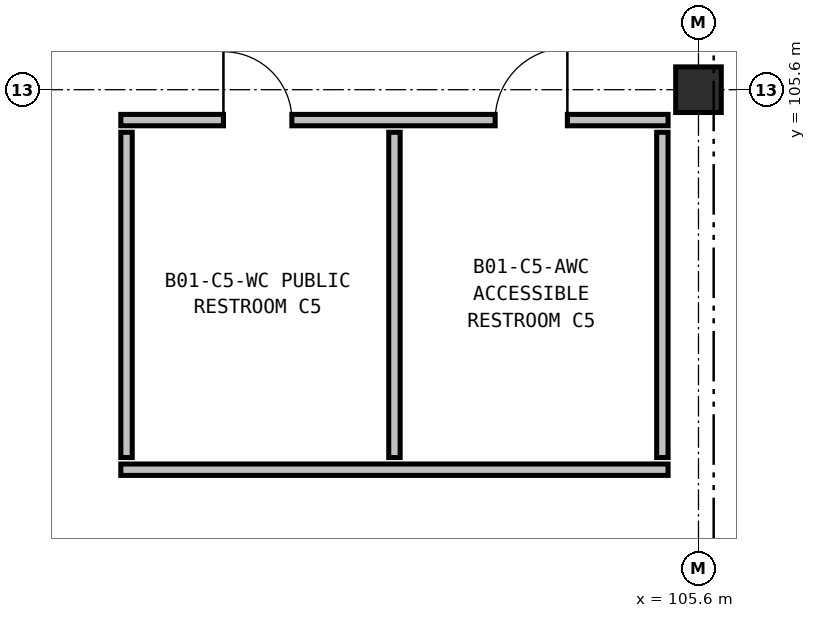
"""IFC4 building model, lengths in metres.
Left out: names, types, materials, properties, quantities, classifications, styles, units other than length and angle.
Written with IfcOpenShell. Run it as: python <this file> out.ifc"""

import sys

from ifc_helpers import new_model, si_unit, direction, frame, frame_2d, origin, origin_2d, place, context, subcontext, project, spatial, rectangle, extrude, element, fill, save


model = new_model("IFC4")
c1 = context("Model", 3, precision=1e-05, world=origin(), true_north=direction((0.0, 1.0)))
c2 = subcontext(c1, "Body", "Model", "MODEL_VIEW")
j1 = project(units=[si_unit("LENGTHUNIT", "METRE"), si_unit("PLANEANGLEUNIT", "RADIAN")], contexts=[c1])
p1 = place(None, origin())
s1 = spatial("IfcSite", under=j1, at=p1, CompositionType="ELEMENT")
p2 = place(p1, origin())
s2 = spatial("IfcBuilding", under=s1, at=p2, CompositionType="ELEMENT")
p3 = place(p2, frame((0.0, 0.0, -5.4)))
s3 = spatial("IfcBuildingStorey", under=s2, at=p3, CompositionType="ELEMENT", Elevation=-5.4)
p4 = place(p3, frame((105.6, 105.6, 0.0), z_axis=(0.0, 0.0, 1.0), x_axis=(1.0, 0.0, 0.0)))
e1 = element("IfcColumn", 1, at=p4, inside=s3, PredefinedType="COLUMN", context=c2, shape_type="SweptSolid", body=[
    extrude(rectangle(XDim=0.6, YDim=0.6, at=origin_2d()), origin(), (0.0, 0.0, 1.0), 5.4),
])
p5 = place(p3, frame((98.0, 105.2, 0.0), z_axis=(0.0, 0.0, 1.0), x_axis=(1.0, 0.0, 0.0)))
e2 = element("IfcWall", 2, at=p5, inside=s3, PredefinedType="PARTITIONING", context=c2, shape_type="SweptSolid", body=[
    extrude(rectangle(XDim=7.2, YDim=0.15, at=frame_2d((3.6, 0.0))), origin(), (0.0, 0.0, 1.0), 5.06),
])
p6 = place(p5, frame((1.35, 0.0, 0.0)))
e3 = element("IfcOpeningElement", 3, at=p6, cuts=e2, PredefinedType="OPENING", context=c2, shape_type="SweptSolid", body=[
    extrude(rectangle(XDim=0.9, YDim=2.1, at=frame_2d((0.45, 1.05))), frame((0.0, 0.085, 0.0), z_axis=(0.0, -1.0, 0.0), x_axis=(1.0, 0.0, 0.0)), (0.0, 0.0, 1.0), 0.17),
])
p7 = place(p5, frame((4.925, 0.0, 0.0)))
e4 = element("IfcOpeningElement", 4, at=p7, cuts=e2, PredefinedType="OPENING", context=c2, shape_type="SweptSolid", body=[
    extrude(rectangle(XDim=0.95, YDim=2.15, at=frame_2d((0.475, 1.075))), frame((0.0, 0.085, 0.0), z_axis=(0.0, -1.0, 0.0), x_axis=(1.0, 0.0, 0.0)), (0.0, 0.0, 1.0), 0.17),
])
p8 = place(p3, frame((98.0, 100.6, 0.0), z_axis=(0.0, 0.0, 1.0), x_axis=(1.0, 0.0, 0.0)))
e5 = element("IfcWall", 5, at=p8, inside=s3, PredefinedType="PARTITIONING", context=c2, shape_type="SweptSolid", body=[
    extrude(rectangle(XDim=7.2, YDim=0.15, at=frame_2d((3.6, 0.0))), origin(), (0.0, 0.0, 1.0), 5.06),
])
for number, where, z_axis, x_axis in (
    (6, (98.075, 100.76, 0.0), (0.0, 0.0, 1.0), (0.0, 1.0, 0.0)),
    (7, (101.6, 100.76, 0.0), (0.0, 0.0, 1.0), (0.0, 1.0, 0.0)),
    (8, (105.125, 100.76, 0.0), (0.0, 0.0, 1.0), (0.0, 1.0, 0.0)),
):
    element("IfcWall", number, at=place(p3, frame(where, z_axis=z_axis, x_axis=x_axis)), inside=s3, PredefinedType="PARTITIONING", context=c2, shape_type="SweptSolid", body=[
        extrude(rectangle(XDim=4.28, YDim=0.15, at=frame_2d((2.14, 0.0))), origin(), (0.0, 0.0, 1.0), 4.435),
    ])
p9 = place(p6, origin())
e9 = element("IfcDoor", 9, at=p9, inside=s3, OperationType="SINGLE_SWING_LEFT", PredefinedType="DOOR", context=c2, shape_type="SweptSolid", body=[
    extrude(rectangle(XDim=0.9, YDim=2.1, at=frame_2d((0.45, 1.05))), frame((0.0, 0.025, 0.0), z_axis=(0.0, -1.0, 0.0), x_axis=(1.0, 0.0, 0.0)), (0.0, 0.0, 1.0), 0.05),
])
fill(e3, e9)
p10 = place(p7, origin())
e10 = element("IfcDoor", 10, at=p10, inside=s3, OperationType="SINGLE_SWING_RIGHT", PredefinedType="DOOR", context=c2, shape_type="SweptSolid", body=[
    extrude(rectangle(XDim=0.95, YDim=2.15, at=frame_2d((0.475, 1.075))), frame((0.0, 0.025, 0.0), z_axis=(0.0, -1.0, 0.0), x_axis=(1.0, 0.0, 0.0)), (0.0, 0.0, 1.0), 0.05),
])
fill(e4, e10)
save(model, sys.argv[1])
